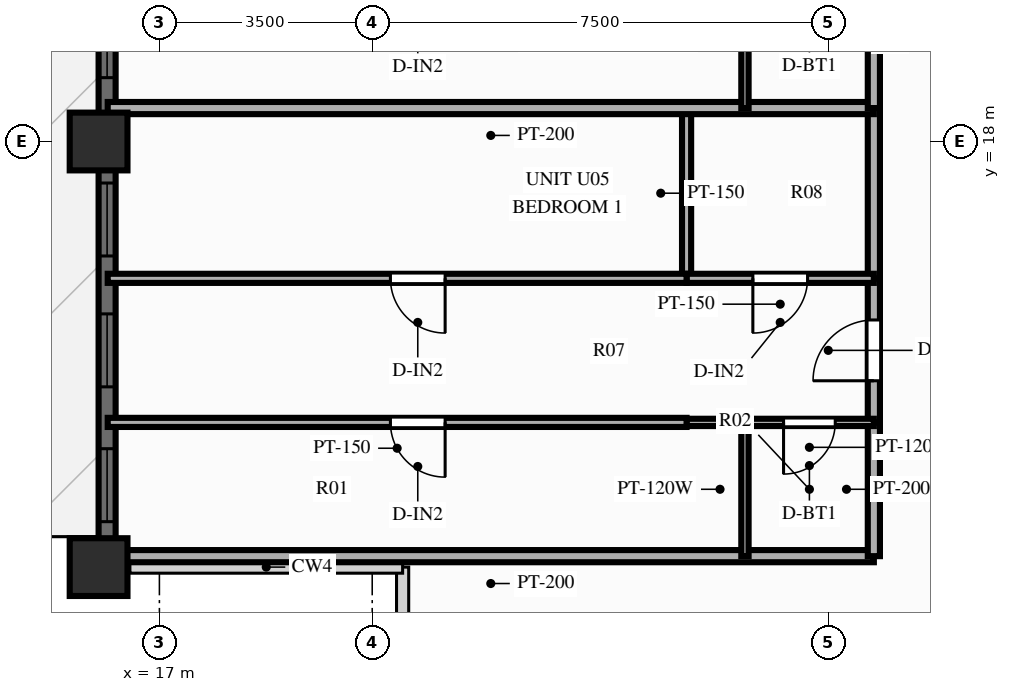
"""IFC4 building model, lengths in metres.
Left out: names, types, materials, properties, quantities, classifications, styles, units other than length and angle.
Written with IfcOpenShell. Run it as: python <this file> out.ifc"""

import sys

from ifc_helpers import new_model, si_unit, direction, frame, frame_2d, origin, origin_2d, place, context, subcontext, project, spatial, rectangle, extrude, source, transform, mapped, element, fill, save


model = new_model("IFC4")
c1 = context("Model", 3, precision=1e-05, world=origin(), true_north=direction((0.0, 1.0)))
c2 = subcontext(c1, "Body", "Model", "MODEL_VIEW")
j1 = project(units=[si_unit("LENGTHUNIT", "METRE"), si_unit("PLANEANGLEUNIT", "RADIAN")], contexts=[c1])
p1 = place(None, origin())
s1 = spatial("IfcSite", under=j1, at=p1, CompositionType="ELEMENT")
p2 = place(p1, origin())
s2 = spatial("IfcBuilding", under=s1, at=p2, CompositionType="ELEMENT")
p3 = place(p2, frame((0.0, 0.0, 156.1)))
s3 = spatial("IfcBuildingStorey", under=s2, at=p3, CompositionType="ELEMENT", Elevation=156.1)
m1 = source(origin(), c2, "Body", "SweptSolid", [
    extrude(rectangle(XDim=0.95, YDim=0.95, at=origin_2d()), origin(), (0.0, 0.0, 1.0), 3.0),
])
for number, where, z_axis, x_axis in (
    (1, (16.0, 18.0, 0.0), (0.0, 0.0, 1.0), (1.0, 0.0, 0.0)),
    (2, (16.0, 11.0, 0.0), (0.0, 0.0, 1.0), (1.0, 0.0, 0.0)),
):
    element("IfcColumn", number, at=place(p3, frame(where, z_axis=z_axis, x_axis=x_axis)), inside=s3, PredefinedType="COLUMN", context=c2, shape_type="MappedRepresentation", body=[
        mapped(m1, transform((0.0, 0.0, 0.0), scale=1.0)),
    ])
p4 = place(p3, frame((16.14, 11.0, 0.0), z_axis=(0.0, 0.0, 1.0), x_axis=(0.0, 1.0, 0.0)))
e3 = element("IfcWall", 3, at=p4, inside=s3, PredefinedType="SOLIDWALL", context=c2, shape_type="SweptSolid", body=[
    extrude(rectangle(XDim=32.0, YDim=0.28, at=frame_2d((16.0, 0.0))), origin(), (0.0, 0.0, 1.0), 2.28),
])
p5 = place(p4, frame((0.748, 0.0, 0.25)))
e4 = element("IfcOpeningElement", 4, at=p5, cuts=e3, PredefinedType="OPENING", context=c2, shape_type="SweptSolid", body=[
    extrude(rectangle(XDim=1.2, YDim=1.5, at=frame_2d((0.6, 0.75))), frame((0.0, 0.152, 0.0), z_axis=(0.0, -1.0, 0.0), x_axis=(1.0, 0.0, 0.0)), (0.0, 0.0, 1.0), 0.304),
])
p6 = place(p4, frame((2.965, 0.0, 0.25)))
e5 = element("IfcOpeningElement", 5, at=p6, cuts=e3, PredefinedType="OPENING", context=c2, shape_type="SweptSolid", body=[
    extrude(rectangle(XDim=1.2, YDim=1.5, at=frame_2d((0.6, 0.75))), frame((0.0, 0.152, 0.0), z_axis=(0.0, -1.0, 0.0), x_axis=(1.0, 0.0, 0.0)), (0.0, 0.0, 1.0), 0.304),
])
p7 = place(p4, frame((5.117, 0.0, 0.25)))
e6 = element("IfcOpeningElement", 6, at=p7, cuts=e3, PredefinedType="OPENING", context=c2, shape_type="SweptSolid", body=[
    extrude(rectangle(XDim=1.2, YDim=1.5, at=frame_2d((0.6, 0.75))), frame((0.0, 0.152, 0.0), z_axis=(0.0, -1.0, 0.0), x_axis=(1.0, 0.0, 0.0)), (0.0, 0.0, 1.0), 0.304),
])
p8 = place(p4, frame((8.05, 0.0, 0.25)))
e7 = element("IfcOpeningElement", 7, at=p8, cuts=e3, PredefinedType="OPENING", context=c2, shape_type="SweptSolid", body=[
    extrude(rectangle(XDim=1.2, YDim=1.5, at=frame_2d((0.6, 0.75))), frame((0.0, 0.152, 0.0), z_axis=(0.0, -1.0, 0.0), x_axis=(1.0, 0.0, 0.0)), (0.0, 0.0, 1.0), 0.304),
])
p9 = place(p4, frame((10.335, 0.0, 0.25)))
e8 = element("IfcOpeningElement", 8, at=p9, cuts=e3, PredefinedType="OPENING", context=c2, shape_type="SweptSolid", body=[
    extrude(rectangle(XDim=1.2, YDim=1.5, at=frame_2d((0.6, 0.75))), frame((0.0, 0.152, 0.0), z_axis=(0.0, -1.0, 0.0), x_axis=(1.0, 0.0, 0.0)), (0.0, 0.0, 1.0), 0.304),
])
p10 = place(p4, frame((12.72, 0.0, 0.0)))
e9 = element("IfcOpeningElement", 9, at=p10, cuts=e3, PredefinedType="OPENING", context=c2, shape_type="SweptSolid", body=[
    extrude(rectangle(XDim=1.6, YDim=2.15, at=frame_2d((0.8, 1.075))), frame((0.0, 0.152, 0.0), z_axis=(0.0, -1.0, 0.0), x_axis=(1.0, 0.0, 0.0)), (0.0, 0.0, 1.0), 0.304),
])
p11 = place(p4, frame((15.4, 0.0, 0.25)))
e10 = element("IfcOpeningElement", 10, at=p11, cuts=e3, PredefinedType="OPENING", context=c2, shape_type="SweptSolid", body=[
    extrude(rectangle(XDim=1.2, YDim=1.5, at=frame_2d((0.6, 0.75))), frame((0.0, 0.152, 0.0), z_axis=(0.0, -1.0, 0.0), x_axis=(1.0, 0.0, 0.0)), (0.0, 0.0, 1.0), 0.304),
])
p12 = place(p4, frame((17.58, 0.0, 0.25)))
e11 = element("IfcOpeningElement", 11, at=p12, cuts=e3, PredefinedType="OPENING", context=c2, shape_type="SweptSolid", body=[
    extrude(rectangle(XDim=1.2, YDim=1.5, at=frame_2d((0.6, 0.75))), frame((0.0, 0.152, 0.0), z_axis=(0.0, -1.0, 0.0), x_axis=(1.0, 0.0, 0.0)), (0.0, 0.0, 1.0), 0.304),
])
p13 = place(p4, frame((19.865, 0.0, 0.25)))
e12 = element("IfcOpeningElement", 12, at=p13, cuts=e3, PredefinedType="OPENING", context=c2, shape_type="SweptSolid", body=[
    extrude(rectangle(XDim=1.2, YDim=1.5, at=frame_2d((0.6, 0.75))), frame((0.0, 0.152, 0.0), z_axis=(0.0, -1.0, 0.0), x_axis=(1.0, 0.0, 0.0)), (0.0, 0.0, 1.0), 0.304),
])
p14 = place(p4, frame((22.45, 0.0, 0.25)))
e13 = element("IfcOpeningElement", 13, at=p14, cuts=e3, PredefinedType="OPENING", context=c2, shape_type="SweptSolid", body=[
    extrude(rectangle(XDim=1.2, YDim=1.5, at=frame_2d((0.6, 0.75))), frame((0.0, 0.152, 0.0), z_axis=(0.0, -1.0, 0.0), x_axis=(1.0, 0.0, 0.0)), (0.0, 0.0, 1.0), 0.304),
])
p15 = place(p4, frame((25.633, 0.0, 0.25)))
e14 = element("IfcOpeningElement", 14, at=p15, cuts=e3, PredefinedType="OPENING", context=c2, shape_type="SweptSolid", body=[
    extrude(rectangle(XDim=0.7, YDim=1.5, at=frame_2d((0.35, 0.75))), frame((0.0, 0.152, 0.0), z_axis=(0.0, -1.0, 0.0), x_axis=(1.0, 0.0, 0.0)), (0.0, 0.0, 1.0), 0.304),
])
p16 = place(p4, frame((27.235, 0.0, 0.25)))
e15 = element("IfcOpeningElement", 15, at=p16, cuts=e3, PredefinedType="OPENING", context=c2, shape_type="SweptSolid", body=[
    extrude(rectangle(XDim=1.2, YDim=1.5, at=frame_2d((0.6, 0.75))), frame((0.0, 0.152, 0.0), z_axis=(0.0, -1.0, 0.0), x_axis=(1.0, 0.0, 0.0)), (0.0, 0.0, 1.0), 0.304),
])
p17 = place(p4, frame((29.752, 0.0, 0.25)))
e16 = element("IfcOpeningElement", 16, at=p17, cuts=e3, PredefinedType="OPENING", context=c2, shape_type="SweptSolid", body=[
    extrude(rectangle(XDim=1.2, YDim=1.5, at=frame_2d((0.6, 0.75))), frame((0.0, 0.152, 0.0), z_axis=(0.0, -1.0, 0.0), x_axis=(1.0, 0.0, 0.0)), (0.0, 0.0, 1.0), 0.304),
])
p18 = place(p3, frame((28.75, 11.18, 0.0), z_axis=(0.0, 0.0, 1.0), x_axis=(-1.0, 0.0, 0.0)))
e17 = element("IfcWall", 17, at=p18, inside=s3, PredefinedType="PARTITIONING", context=c2, shape_type="SweptSolid", body=[
    extrude(rectangle(XDim=12.6, YDim=0.2, at=frame_2d((6.3, 0.0))), origin(), (0.0, 0.0, 1.0), 2.79),
])
p19 = place(p3, frame((28.75, 11.18, 0.0), z_axis=(0.0, 0.0, 1.0), x_axis=(0.0, 1.0, 0.0)))
e18 = element("IfcWall", 18, at=p19, inside=s3, PredefinedType="PARTITIONING", context=c2, shape_type="SweptSolid", body=[
    extrude(rectangle(XDim=2.2, YDim=0.2, at=frame_2d((1.1, 0.0))), origin(), (0.0, 0.0, 1.0), 2.79),
])
p20 = place(p3, frame((28.75, 13.38, 0.0), z_axis=(0.0, 0.0, 1.0), x_axis=(0.0, 1.0, 0.0)))
e19 = element("IfcWall", 19, at=p20, inside=s3, PredefinedType="PARTITIONING", context=c2, shape_type="SweptSolid", body=[
    extrude(rectangle(XDim=2.37, YDim=0.2, at=frame_2d((1.185, 0.0))), origin(), (0.0, 0.0, 1.0), 2.79),
])
p21 = place(p20, frame((0.685, 0.0, 0.0)))
e20 = element("IfcOpeningElement", 20, at=p21, cuts=e19, PredefinedType="OPENING", context=c2, shape_type="SweptSolid", body=[
    extrude(rectangle(XDim=1.0, YDim=2.15, at=frame_2d((0.5, 1.075))), frame((0.0, 0.112, 0.0), z_axis=(0.0, -1.0, 0.0), x_axis=(1.0, 0.0, 0.0)), (0.0, 0.0, 1.0), 0.224),
])
p22 = place(p3, frame((28.75, 15.75, 0.0), z_axis=(0.0, 0.0, 1.0), x_axis=(0.0, 1.0, 0.0)))
e21 = element("IfcWall", 21, at=p22, inside=s3, PredefinedType="PARTITIONING", context=c2, shape_type="SweptSolid", body=[
    extrude(rectangle(XDim=2.801, YDim=0.2, at=frame_2d((1.4, 0.0))), origin(), (0.0, 0.0, 1.0), 2.79),
])
p23 = place(p3, frame((26.63, 11.18, 0.0), z_axis=(0.0, 0.0, 1.0), x_axis=(0.0, 1.0, 0.0)))
e22 = element("IfcWall", 22, at=p23, inside=s3, PredefinedType="PARTITIONING", context=c2, shape_type="SweptSolid", body=[
    extrude(rectangle(XDim=2.2, YDim=0.12, at=frame_2d((1.1, 0.0))), origin(), (0.0, 0.0, 1.0), 2.79),
])
p24 = place(p3, frame((25.67, 15.75, 0.0), z_axis=(0.0, 0.0, 1.0), x_axis=(0.0, 1.0, 0.0)))
e23 = element("IfcWall", 23, at=p24, inside=s3, PredefinedType="PARTITIONING", context=c2, shape_type="SweptSolid", body=[
    extrude(rectangle(XDim=2.801, YDim=0.15, at=frame_2d((1.4, 0.0))), origin(), (0.0, 0.0, 1.0), 2.79),
])
p25 = place(p3, frame((28.75, 13.38, 0.0), z_axis=(0.0, 0.0, 1.0), x_axis=(-1.0, 0.0, 0.0)))
e24 = element("IfcWall", 24, at=p25, inside=s3, PredefinedType="PARTITIONING", context=c2, shape_type="SweptSolid", body=[
    extrude(rectangle(XDim=2.12, YDim=0.12, at=frame_2d((1.06, 0.0))), origin(), (0.0, 0.0, 1.0), 2.79),
])
p26 = place(p25, frame((0.635, 0.0, 0.0)))
e25 = element("IfcOpeningElement", 25, at=p26, cuts=e24, PredefinedType="OPENING", context=c2, shape_type="SweptSolid", body=[
    extrude(rectangle(XDim=0.85, YDim=2.05, at=frame_2d((0.425, 1.025))), frame((0.0, 0.072, 0.0), z_axis=(0.0, -1.0, 0.0), x_axis=(1.0, 0.0, 0.0)), (0.0, 0.0, 1.0), 0.144),
])
p27 = place(p3, frame((26.63, 13.38, 0.0), z_axis=(0.0, 0.0, 1.0), x_axis=(-1.0, 0.0, 0.0)))
e26 = element("IfcWall", 26, at=p27, inside=s3, PredefinedType="PARTITIONING", context=c2, shape_type="SweptSolid", body=[
    extrude(rectangle(XDim=0.96, YDim=0.12, at=frame_2d((0.48, 0.0))), origin(), (0.0, 0.0, 1.0), 2.79),
])
p28 = place(p3, frame((25.67, 13.38, 0.0), z_axis=(0.0, 0.0, 1.0), x_axis=(-1.0, 0.0, 0.0)))
e27 = element("IfcWall", 27, at=p28, inside=s3, PredefinedType="PARTITIONING", context=c2, shape_type="SweptSolid", body=[
    extrude(rectangle(XDim=9.52, YDim=0.15, at=frame_2d((4.76, 0.0))), origin(), (0.0, 0.0, 1.0), 2.79),
])
p29 = place(p28, frame((3.971, 0.0, 0.0)))
e28 = element("IfcOpeningElement", 28, at=p29, cuts=e27, PredefinedType="OPENING", context=c2, shape_type="SweptSolid", body=[
    extrude(rectangle(XDim=0.9, YDim=2.1, at=frame_2d((0.45, 1.05))), frame((0.0, 0.087, 0.0), z_axis=(0.0, -1.0, 0.0), x_axis=(1.0, 0.0, 0.0)), (0.0, 0.0, 1.0), 0.174),
])
p30 = place(p3, frame((28.75, 15.75, 0.0), z_axis=(0.0, 0.0, 1.0), x_axis=(-1.0, 0.0, 0.0)))
e29 = element("IfcWall", 29, at=p30, inside=s3, PredefinedType="PARTITIONING", context=c2, shape_type="SweptSolid", body=[
    extrude(rectangle(XDim=3.08, YDim=0.15, at=frame_2d((1.54, 0.0))), origin(), (0.0, 0.0, 1.0), 2.79),
])
p31 = place(p30, frame((1.09, 0.0, 0.0)))
e30 = element("IfcOpeningElement", 30, at=p31, cuts=e29, PredefinedType="OPENING", context=c2, shape_type="SweptSolid", body=[
    extrude(rectangle(XDim=0.9, YDim=2.1, at=frame_2d((0.45, 1.05))), frame((0.0, 0.087, 0.0), z_axis=(0.0, -1.0, 0.0), x_axis=(1.0, 0.0, 0.0)), (0.0, 0.0, 1.0), 0.174),
])
p32 = place(p3, frame((25.67, 15.75, 0.0), z_axis=(0.0, 0.0, 1.0), x_axis=(-1.0, 0.0, 0.0)))
e31 = element("IfcWall", 31, at=p32, inside=s3, PredefinedType="PARTITIONING", context=c2, shape_type="SweptSolid", body=[
    extrude(rectangle(XDim=9.52, YDim=0.15, at=frame_2d((4.76, 0.0))), origin(), (0.0, 0.0, 1.0), 2.79),
])
p33 = place(p32, frame((3.971, 0.0, 0.0)))
e32 = element("IfcOpeningElement", 32, at=p33, cuts=e31, PredefinedType="OPENING", context=c2, shape_type="SweptSolid", body=[
    extrude(rectangle(XDim=0.9, YDim=2.1, at=frame_2d((0.45, 1.05))), frame((0.0, 0.087, 0.0), z_axis=(0.0, -1.0, 0.0), x_axis=(1.0, 0.0, 0.0)), (0.0, 0.0, 1.0), 0.174),
])
p34 = place(p3, frame((28.75, 18.55, 0.0), z_axis=(0.0, 0.0, 1.0), x_axis=(-1.0, 0.0, 0.0)))
e33 = element("IfcWall", 33, at=p34, inside=s3, PredefinedType="PARTITIONING", context=c2, shape_type="SweptSolid", body=[
    extrude(rectangle(XDim=12.6, YDim=0.2, at=frame_2d((6.3, 0.0))), origin(), (0.0, 0.0, 1.0), 2.79),
])
p35 = place(p3, frame((28.75, 18.55, 0.0), z_axis=(0.0, 0.0, 1.0), x_axis=(0.0, 1.0, 0.0)))
e34 = element("IfcWall", 34, at=p35, inside=s3, PredefinedType="PARTITIONING", context=c2, shape_type="SweptSolid", body=[
    extrude(rectangle(XDim=2.2, YDim=0.2, at=frame_2d((1.1, 0.0))), origin(), (0.0, 0.0, 1.0), 2.79),
])
p36 = place(p3, frame((26.63, 18.55, 0.0), z_axis=(0.0, 0.0, 1.0), x_axis=(0.0, 1.0, 0.0)))
e35 = element("IfcWall", 35, at=p36, inside=s3, PredefinedType="PARTITIONING", context=c2, shape_type="SweptSolid", body=[
    extrude(rectangle(XDim=2.2, YDim=0.12, at=frame_2d((1.1, 0.0))), origin(), (0.0, 0.0, 1.0), 2.79),
])
m2 = source(origin(), c2, "Body", "SweptSolid", [
    extrude(rectangle(XDim=1.2, YDim=1.5, at=frame_2d((0.6, 0.75))), frame((0.0, 0.03, 0.0), z_axis=(0.0, -1.0, 0.0), x_axis=(1.0, 0.0, 0.0)), (0.0, 0.0, 1.0), 0.06),
])
p37 = place(p5, origin())
e36 = element("IfcWindow", 36, at=p37, inside=s3, PartitioningType="SINGLE_PANEL", PredefinedType="WINDOW", context=c2, shape_type="MappedRepresentation", body=[
    mapped(m2, transform((0.0, 0.0, 0.0), scale=1.0)),
])
fill(e4, e36)
p38 = place(p6, origin())
e37 = element("IfcWindow", 37, at=p38, inside=s3, PartitioningType="SINGLE_PANEL", PredefinedType="WINDOW", context=c2, shape_type="MappedRepresentation", body=[
    mapped(m2, transform((0.0, 0.0, 0.0), scale=1.0)),
])
fill(e5, e37)
p39 = place(p7, origin())
e38 = element("IfcWindow", 38, at=p39, inside=s3, PartitioningType="SINGLE_PANEL", PredefinedType="WINDOW", context=c2, shape_type="MappedRepresentation", body=[
    mapped(m2, transform((0.0, 0.0, 0.0), scale=1.0)),
])
fill(e6, e38)
p40 = place(p8, origin())
e39 = element("IfcWindow", 39, at=p40, inside=s3, PartitioningType="SINGLE_PANEL", PredefinedType="WINDOW", context=c2, shape_type="MappedRepresentation", body=[
    mapped(m2, transform((0.0, 0.0, 0.0), scale=1.0)),
])
fill(e7, e39)
m3 = source(origin(), c2, "Body", "SweptSolid", [
    extrude(rectangle(XDim=1.0, YDim=2.15, at=frame_2d((0.5, 1.075))), frame((0.0, 0.025, 0.0), z_axis=(0.0, -1.0, 0.0), x_axis=(1.0, 0.0, 0.0)), (0.0, 0.0, 1.0), 0.05),
])
p41 = place(p21, origin())
e40 = element("IfcDoor", 40, at=p41, inside=s3, OperationType="SINGLE_SWING_LEFT", PredefinedType="DOOR", context=c2, shape_type="MappedRepresentation", body=[
    mapped(m3, transform((0.0, 0.0, 0.0), scale=1.0)),
])
fill(e20, e40)
m4 = source(origin(), c2, "Body", "SweptSolid", [
    extrude(rectangle(XDim=0.85, YDim=2.05, at=frame_2d((0.425, 1.025))), frame((0.0, 0.025, 0.0), z_axis=(0.0, -1.0, 0.0), x_axis=(1.0, 0.0, 0.0)), (0.0, 0.0, 1.0), 0.05),
])
p42 = place(p26, origin())
e41 = element("IfcDoor", 41, at=p42, inside=s3, OperationType="SINGLE_SWING_RIGHT", PredefinedType="DOOR", context=c2, shape_type="MappedRepresentation", body=[
    mapped(m4, transform((0.0, 0.0, 0.0), scale=1.0)),
])
fill(e25, e41)
m5 = source(origin(), c2, "Body", "SweptSolid", [
    extrude(rectangle(XDim=0.9, YDim=2.1, at=frame_2d((0.45, 1.05))), frame((0.0, 0.025, 0.0), z_axis=(0.0, -1.0, 0.0), x_axis=(1.0, 0.0, 0.0)), (0.0, 0.0, 1.0), 0.05),
])
p43 = place(p29, origin())
e42 = element("IfcDoor", 42, at=p43, inside=s3, OperationType="SINGLE_SWING_LEFT", PredefinedType="DOOR", context=c2, shape_type="MappedRepresentation", body=[
    mapped(m5, transform((0.0, 0.0, 0.0), scale=1.0)),
])
fill(e28, e42)
p44 = place(p31, origin())
e43 = element("IfcDoor", 43, at=p44, inside=s3, OperationType="SINGLE_SWING_RIGHT", PredefinedType="DOOR", context=c2, shape_type="MappedRepresentation", body=[
    mapped(m5, transform((0.0, 0.0, 0.0), scale=1.0)),
])
fill(e30, e43)
p45 = place(p33, origin())
e44 = element("IfcDoor", 44, at=p45, inside=s3, OperationType="SINGLE_SWING_LEFT", PredefinedType="DOOR", context=c2, shape_type="MappedRepresentation", body=[
    mapped(m5, transform((0.0, 0.0, 0.0), scale=1.0)),
])
fill(e32, e44)
save(model, sys.argv[1])
